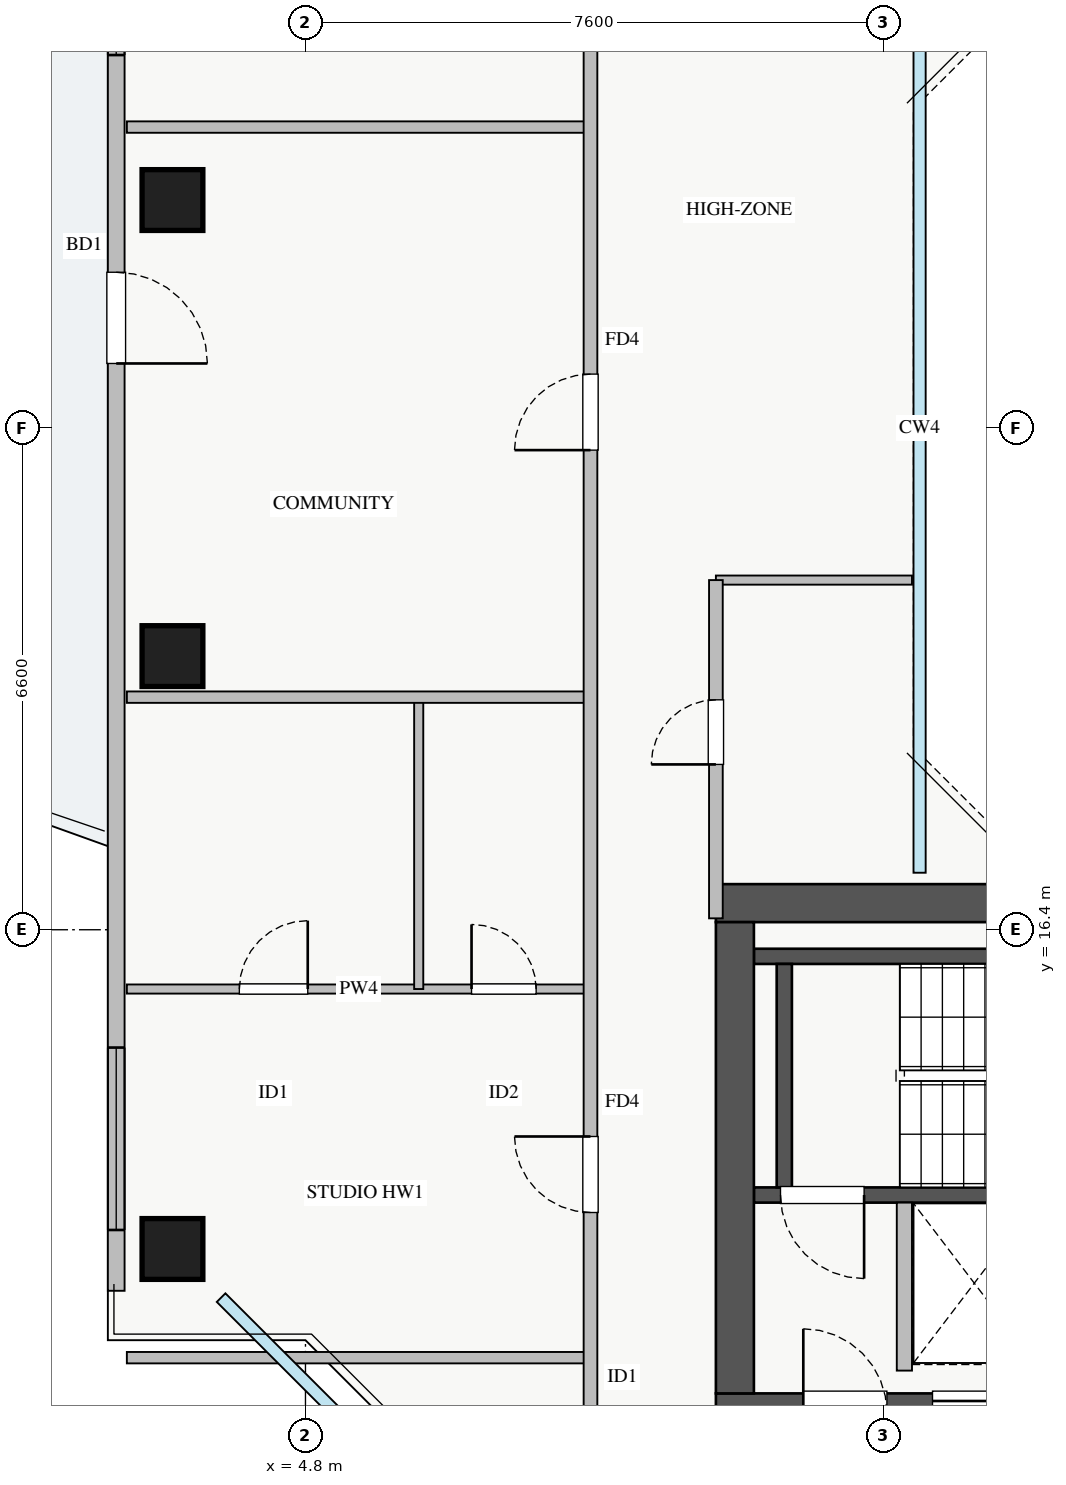
"""IFC4 building model, lengths in metres.
Left out: names, types, materials, properties, quantities, classifications, styles, units other than length and angle.
Written with IfcOpenShell. Run it as: python <this file> out.ifc"""

import sys

from ifc_helpers import new_model, si_unit, direction, frame, frame_2d, origin, origin_2d, place, context, subcontext, project, spatial, rectangle, extrude, source, transform, mapped, element, fill, save


model = new_model("IFC4")
c1 = context("Model", 3, precision=1e-05, world=origin(), true_north=direction((0.0, 1.0)))
c2 = subcontext(c1, "Body", "Model", "MODEL_VIEW")
j1 = project(units=[si_unit("LENGTHUNIT", "METRE"), si_unit("PLANEANGLEUNIT", "RADIAN")], contexts=[c1])
p1 = place(None, origin())
s1 = spatial("IfcSite", under=j1, at=p1, CompositionType="ELEMENT")
p2 = place(p1, origin())
s2 = spatial("IfcBuilding", under=s1, at=p2, CompositionType="ELEMENT")
p3 = place(p2, frame((0.0, 0.0, 203.5)))
s3 = spatial("IfcBuildingStorey", under=s2, at=p3, CompositionType="ELEMENT", Elevation=203.5)
p4 = place(p3, frame((12.68, 12.8, 0.0), z_axis=(0.0, 0.0, 1.0), x_axis=(1.0, 0.0, 0.0)))
e1 = element("IfcWall", 1, at=p4, inside=s3, PredefinedType="SHEAR", context=c2, shape_type="SweptSolid", body=[
    extrude(rectangle(XDim=1.94, YDim=0.18, at=frame_2d((0.97, 0.0))), origin(), (0.0, 0.0, 1.0), 3.07),
])
p5 = place(p3, frame((10.7, 12.91, 0.0), z_axis=(0.0, 0.0, 1.0), x_axis=(1.0, 0.0, 0.0)))
e2 = element("IfcWall", 2, at=p5, inside=s3, PredefinedType="SHEAR", context=c2, shape_type="SweptSolid", body=[
    extrude(rectangle(XDim=7.45, YDim=0.2, at=frame_2d((3.725, 0.0))), origin(), (0.0, 0.0, 1.0), 3.25),
])
p6 = place(p5, frame((0.35, 0.0, 0.0)))
e3 = element("IfcOpeningElement", 3, at=p6, cuts=e2, PredefinedType="OPENING", context=c2, shape_type="SweptSolid", body=[
    extrude(rectangle(XDim=1.1, YDim=2.05, at=frame_2d((0.55, 1.025))), frame((0.0, 0.11, 0.0), z_axis=(0.0, -1.0, 0.0), x_axis=(1.0, 0.0, 0.0)), (0.0, 0.0, 1.0), 0.22),
])
p7 = place(p3, frame((10.7, 16.05, 0.0), z_axis=(0.0, 0.0, 1.0), x_axis=(1.0, 0.0, 0.0)))
e4 = element("IfcWall", 4, at=p7, inside=s3, PredefinedType="SHEAR", context=c2, shape_type="SweptSolid", body=[
    extrude(rectangle(XDim=7.45, YDim=0.2, at=frame_2d((3.725, 0.0))), origin(), (0.0, 0.0, 1.0), 3.25),
])
p8 = place(p3, frame((11.1, 13.01, 0.0), z_axis=(0.0, 0.0, 1.0), x_axis=(0.0, 1.0, 0.0)))
e5 = element("IfcWall", 5, at=p8, inside=s3, PredefinedType="SHEAR", context=c2, shape_type="SweptSolid", body=[
    extrude(rectangle(XDim=2.94, YDim=0.2, at=frame_2d((1.47, 0.0))), origin(), (0.0, 0.0, 1.0), 3.25),
])
p9 = place(p3, frame((10.2, 10.05, 0.0), z_axis=(0.0, 0.0, 1.0), x_axis=(1.0, 0.0, 0.0)))
e6 = element("IfcWall", 6, at=p9, inside=s3, PredefinedType="SHEAR", context=c2, shape_type="SweptSolid", body=[
    extrude(rectangle(XDim=17.6, YDim=0.5, at=frame_2d((8.8, 0.0))), origin(), (0.0, 0.0, 1.0), 3.25),
])
p10 = place(p9, frame((1.15, 0.0, 0.0)))
e7 = element("IfcOpeningElement", 7, at=p10, cuts=e6, PredefinedType="OPENING", context=c2, shape_type="SweptSolid", body=[
    extrude(rectangle(XDim=1.1, YDim=2.05, at=frame_2d((0.55, 1.025))), frame((0.0, 0.26, 0.0), z_axis=(0.0, -1.0, 0.0), x_axis=(1.0, 0.0, 0.0)), (0.0, 0.0, 1.0), 0.52),
])
p11 = place(p9, frame((8.3, 0.0, 0.0)))
e8 = element("IfcOpeningElement", 8, at=p11, cuts=e6, PredefinedType="OPENING", context=c2, shape_type="SweptSolid", body=[
    extrude(rectangle(XDim=1.1, YDim=2.05, at=frame_2d((0.55, 1.025))), frame((0.0, 0.26, 0.0), z_axis=(0.0, -1.0, 0.0), x_axis=(1.0, 0.0, 0.0)), (0.0, 0.0, 1.0), 0.52),
])
p12 = place(p9, frame((2.85, 0.0, 0.0)))
e9 = element("IfcOpeningElement", 9, at=p12, cuts=e6, PredefinedType="OPENING", context=c2, shape_type="SweptSolid", body=[
    extrude(rectangle(XDim=1.1, YDim=2.05, at=frame_2d((0.55, 1.025))), frame((0.0, 0.26, 0.0), z_axis=(0.0, -1.0, 0.0), x_axis=(1.0, 0.0, 0.0)), (0.0, 0.0, 1.0), 0.52),
])
p13 = place(p9, frame((5.8, 0.0, 0.0)))
e10 = element("IfcOpeningElement", 10, at=p13, cuts=e6, PredefinedType="OPENING", context=c2, shape_type="SweptSolid", body=[
    extrude(rectangle(XDim=1.0, YDim=2.05, at=frame_2d((0.5, 1.025))), frame((0.0, 0.26, 0.0), z_axis=(0.0, -1.0, 0.0), x_axis=(1.0, 0.0, 0.0)), (0.0, 0.0, 1.0), 0.52),
])
p14 = place(p9, frame((14.74, 0.0, 0.0)))
e11 = element("IfcOpeningElement", 11, at=p14, cuts=e6, PredefinedType="OPENING", context=c2, shape_type="SweptSolid", body=[
    extrude(rectangle(XDim=1.0, YDim=2.05, at=frame_2d((0.5, 1.025))), frame((0.0, 0.26, 0.0), z_axis=(0.0, -1.0, 0.0), x_axis=(1.0, 0.0, 0.0)), (0.0, 0.0, 1.0), 0.52),
])
p15 = place(p9, frame((10.155, 0.0, 0.0)))
e12 = element("IfcOpeningElement", 12, at=p15, cuts=e6, PredefinedType="OPENING", context=c2, shape_type="SweptSolid", body=[
    extrude(rectangle(XDim=1.0, YDim=2.05, at=frame_2d((0.5, 1.025))), frame((0.0, 0.26, 0.0), z_axis=(0.0, -1.0, 0.0), x_axis=(1.0, 0.0, 0.0)), (0.0, 0.0, 1.0), 0.52),
])
p16 = place(p9, frame((11.87, 0.0, 0.0)))
e13 = element("IfcOpeningElement", 13, at=p16, cuts=e6, PredefinedType="OPENING", context=c2, shape_type="SweptSolid", body=[
    extrude(rectangle(XDim=1.0, YDim=2.05, at=frame_2d((0.5, 1.025))), frame((0.0, 0.26, 0.0), z_axis=(0.0, -1.0, 0.0), x_axis=(1.0, 0.0, 0.0)), (0.0, 0.0, 1.0), 0.52),
])
p17 = place(p9, frame((13.46, 0.0, 0.0)))
e14 = element("IfcOpeningElement", 14, at=p17, cuts=e6, PredefinedType="OPENING", context=c2, shape_type="SweptSolid", body=[
    extrude(rectangle(XDim=1.0, YDim=2.05, at=frame_2d((0.5, 1.025))), frame((0.0, 0.26, 0.0), z_axis=(0.0, -1.0, 0.0), x_axis=(1.0, 0.0, 0.0)), (0.0, 0.0, 1.0), 0.52),
])
p18 = place(p3, frame((10.2, 16.75, 0.0), z_axis=(0.0, 0.0, 1.0), x_axis=(1.0, 0.0, 0.0)))
e15 = element("IfcWall", 15, at=p18, inside=s3, PredefinedType="SHEAR", context=c2, shape_type="SweptSolid", body=[
    extrude(rectangle(XDim=17.6, YDim=0.5, at=frame_2d((8.8, 0.0))), origin(), (0.0, 0.0, 1.0), 3.25),
])
p19 = place(p3, frame((10.45, 10.3, 0.0), z_axis=(0.0, 0.0, 1.0), x_axis=(0.0, 1.0, 0.0)))
e16 = element("IfcWall", 16, at=p19, inside=s3, PredefinedType="SHEAR", context=c2, shape_type="SweptSolid", body=[
    extrude(rectangle(XDim=6.2, YDim=0.5, at=frame_2d((3.1, 0.0))), origin(), (0.0, 0.0, 1.0), 3.25),
])
m1 = source(origin(), c2, "Body", "SweptSolid", [
    extrude(rectangle(XDim=0.8, YDim=0.8, at=origin_2d()), origin(), (0.0, 0.0, 1.0), 3.25),
])
for number, where, z_axis, x_axis in (
    (17, (3.05, 26.0, 0.0), (0.0, 0.0, 1.0), (1.0, 0.0, 0.0)),
    (18, (3.05, 20.0, 0.0), (0.0, 0.0, 1.0), (1.0, 0.0, 0.0)),
    (19, (3.05, 12.2, 0.0), (0.0, 0.0, 1.0), (1.0, 0.0, 0.0)),
):
    element("IfcColumn", number, at=place(p3, frame(where, z_axis=z_axis, x_axis=x_axis)), inside=s3, PredefinedType="COLUMN", context=c2, shape_type="MappedRepresentation", body=[
        mapped(m1, transform((0.0, 0.0, 0.0), x_axis=(1.0, 0.0, 0.0), y_axis=(0.0, 1.0, 0.0), z_axis=(0.0, 0.0, 1.0), scale=1.0)),
    ])
p20 = place(p3, frame((2.31, 11.65, 0.0), z_axis=(0.0, 0.0, 1.0), x_axis=(0.0, 1.0, 0.0)))
e20 = element("IfcWall", 20, at=p20, inside=s3, PredefinedType="STANDARD", context=c2, shape_type="SweptSolid", body=[
    extrude(rectangle(XDim=22.7, YDim=0.22, at=frame_2d((11.35, 0.0))), origin(), (0.0, 0.0, 1.0), 2.61),
])
p21 = place(p20, frame((12.2, 0.0, 0.0)))
e21 = element("IfcOpeningElement", 21, at=p21, cuts=e20, PredefinedType="OPENING", context=c2, shape_type="SweptSolid", body=[
    extrude(rectangle(XDim=1.2, YDim=2.1, at=frame_2d((0.6, 1.05))), frame((0.0, 0.12, 0.0), z_axis=(0.0, -1.0, 0.0), x_axis=(1.0, 0.0, 0.0)), (0.0, 0.0, 1.0), 0.24),
])
p22 = place(p20, frame((0.8, 0.0, 0.9)))
e22 = element("IfcOpeningElement", 22, at=p22, cuts=e20, PredefinedType="OPENING", context=c2, shape_type="SweptSolid", body=[
    extrude(rectangle(XDim=2.4, YDim=1.5, at=frame_2d((1.2, 0.75))), frame((0.0, 0.12, 0.0), z_axis=(0.0, -1.0, 0.0), x_axis=(1.0, 0.0, 0.0)), (0.0, 0.0, 1.0), 0.24),
])
p23 = place(p20, frame((20.08, 0.0, 0.9)))
e23 = element("IfcOpeningElement", 23, at=p23, cuts=e20, PredefinedType="OPENING", context=c2, shape_type="SweptSolid", body=[
    extrude(rectangle(XDim=2.1, YDim=1.5, at=frame_2d((1.05, 0.75))), frame((0.0, 0.12, 0.0), z_axis=(0.0, -1.0, 0.0), x_axis=(1.0, 0.0, 0.0)), (0.0, 0.0, 1.0), 0.24),
])
p24 = place(p20, frame((16.258, 0.0, 0.9)))
e24 = element("IfcOpeningElement", 24, at=p24, cuts=e20, PredefinedType="OPENING", context=c2, shape_type="SweptSolid", body=[
    extrude(rectangle(XDim=2.4, YDim=1.5, at=frame_2d((1.2, 0.75))), frame((0.0, 0.12, 0.0), z_axis=(0.0, -1.0, 0.0), x_axis=(1.0, 0.0, 0.0)), (0.0, 0.0, 1.0), 0.24),
])
p25 = place(p3, frame((12.68, 10.6, 0.0), z_axis=(0.0, 0.0, 1.0), x_axis=(0.0, 1.0, 0.0)))
e25 = element("IfcWall", 25, at=p25, inside=s3, PredefinedType="PARTITIONING", context=c2, shape_type="SweptSolid", body=[
    extrude(rectangle(XDim=2.21, YDim=0.2, at=frame_2d((1.105, 0.0))), origin(), (0.0, 0.0, 1.0), 3.07),
])
p26 = place(p3, frame((2.45, 10.77, 0.0), z_axis=(0.0, 0.0, 1.0), x_axis=(1.0, 0.0, 0.0)))
e26 = element("IfcWall", 26, at=p26, inside=s3, PredefinedType="PARTITIONING", context=c2, shape_type="SweptSolid", body=[
    extrude(rectangle(XDim=6.1, YDim=0.15, at=frame_2d((3.05, 0.0))), origin(), (0.0, 0.0, 1.0), 3.07),
])
p27 = place(p3, frame((2.45, 15.62, 0.0), z_axis=(0.0, 0.0, 1.0), x_axis=(1.0, 0.0, 0.0)))
e27 = element("IfcWall", 27, at=p27, inside=s3, PredefinedType="PLUMBINGWALL", context=c2, shape_type="SweptSolid", body=[
    extrude(rectangle(XDim=6.1, YDim=0.12, at=frame_2d((3.05, 0.0))), origin(), (0.0, 0.0, 1.0), 3.07),
])
p28 = place(p27, frame((1.48, 0.0, 0.0)))
e28 = element("IfcOpeningElement", 28, at=p28, cuts=e27, PredefinedType="OPENING", context=c2, shape_type="SweptSolid", body=[
    extrude(rectangle(XDim=0.9, YDim=2.05, at=frame_2d((0.45, 1.025))), frame((0.0, 0.07, 0.0), z_axis=(0.0, -1.0, 0.0), x_axis=(1.0, 0.0, 0.0)), (0.0, 0.0, 1.0), 0.14),
])
p29 = place(p27, frame((4.535, 0.0, 0.0)))
e29 = element("IfcOpeningElement", 29, at=p29, cuts=e27, PredefinedType="OPENING", context=c2, shape_type="SweptSolid", body=[
    extrude(rectangle(XDim=0.85, YDim=2.05, at=frame_2d((0.425, 1.025))), frame((0.0, 0.07, 0.0), z_axis=(0.0, -1.0, 0.0), x_axis=(1.0, 0.0, 0.0)), (0.0, 0.0, 1.0), 0.14),
])
p30 = place(p3, frame((6.29, 15.62, 0.0), z_axis=(0.0, 0.0, 1.0), x_axis=(0.0, 1.0, 0.0)))
e30 = element("IfcWall", 30, at=p30, inside=s3, PredefinedType="PLUMBINGWALL", context=c2, shape_type="SweptSolid", body=[
    extrude(rectangle(XDim=3.84, YDim=0.12, at=frame_2d((1.92, 0.0))), origin(), (0.0, 0.0, 1.0), 3.07),
])
for number, where, z_axis, x_axis in (
    (31, (2.45, 19.46, 0.0), (0.0, 0.0, 1.0), (1.0, 0.0, 0.0)),
    (32, (2.45, 26.96, 0.0), (0.0, 0.0, 1.0), (1.0, 0.0, 0.0)),
):
    element("IfcWall", number, at=place(p3, frame(where, z_axis=z_axis, x_axis=x_axis)), inside=s3, PredefinedType="PARTITIONING", context=c2, shape_type="SweptSolid", body=[
        extrude(rectangle(XDim=6.1, YDim=0.15, at=frame_2d((3.05, 0.0))), origin(), (0.0, 0.0, 1.0), 3.07),
    ])
p31 = place(p3, frame((8.55, 6.2, 0.0), z_axis=(0.0, 0.0, 1.0), x_axis=(0.0, 1.0, 0.0)))
e33 = element("IfcWall", 33, at=p31, inside=s3, PredefinedType="PARTITIONING", context=c2, shape_type="SweptSolid", body=[
    extrude(rectangle(XDim=33.6, YDim=0.18, at=frame_2d((16.8, 0.0))), origin(), (0.0, 0.0, 1.0), 3.07),
])
p32 = place(p31, frame((29.605, 0.0, 0.0)))
e34 = element("IfcOpeningElement", 34, at=p32, cuts=e33, PredefinedType="OPENING", context=c2, shape_type="SweptSolid", body=[
    extrude(rectangle(XDim=0.9, YDim=2.05, at=frame_2d((0.45, 1.025))), frame((0.0, 0.1, 0.0), z_axis=(0.0, -1.0, 0.0), x_axis=(1.0, 0.0, 0.0)), (0.0, 0.0, 1.0), 0.2),
])
p33 = place(p31, frame((2.92, 0.0, 0.0)))
e35 = element("IfcOpeningElement", 35, at=p33, cuts=e33, PredefinedType="OPENING", context=c2, shape_type="SweptSolid", body=[
    extrude(rectangle(XDim=0.9, YDim=2.05, at=frame_2d((0.45, 1.025))), frame((0.0, 0.1, 0.0), z_axis=(0.0, -1.0, 0.0), x_axis=(1.0, 0.0, 0.0)), (0.0, 0.0, 1.0), 0.2),
])
p34 = place(p31, frame((6.48, 0.0, 0.0)))
e36 = element("IfcOpeningElement", 36, at=p34, cuts=e33, PredefinedType="OPENING", context=c2, shape_type="SweptSolid", body=[
    extrude(rectangle(XDim=1.0, YDim=2.05, at=frame_2d((0.5, 1.025))), frame((0.0, 0.1, 0.0), z_axis=(0.0, -1.0, 0.0), x_axis=(1.0, 0.0, 0.0)), (0.0, 0.0, 1.0), 0.2),
])
p35 = place(p31, frame((16.51, 0.0, 0.0)))
e37 = element("IfcOpeningElement", 37, at=p35, cuts=e33, PredefinedType="OPENING", context=c2, shape_type="SweptSolid", body=[
    extrude(rectangle(XDim=1.0, YDim=2.05, at=frame_2d((0.5, 1.025))), frame((0.0, 0.1, 0.0), z_axis=(0.0, -1.0, 0.0), x_axis=(1.0, 0.0, 0.0)), (0.0, 0.0, 1.0), 0.2),
])
p36 = place(p31, frame((22.21, 0.0, 0.0)))
e38 = element("IfcOpeningElement", 38, at=p36, cuts=e33, PredefinedType="OPENING", context=c2, shape_type="SweptSolid", body=[
    extrude(rectangle(XDim=1.0, YDim=2.05, at=frame_2d((0.5, 1.025))), frame((0.0, 0.1, 0.0), z_axis=(0.0, -1.0, 0.0), x_axis=(1.0, 0.0, 0.0)), (0.0, 0.0, 1.0), 0.2),
])
p37 = place(p3, frame((10.2, 21.0, 0.0), z_axis=(0.0, 0.0, 1.0), x_axis=(1.0, 0.0, 0.0)))
e39 = element("IfcWall", 39, at=p37, inside=s3, PredefinedType="PLUMBINGWALL", context=c2, shape_type="SweptSolid", body=[
    extrude(rectangle(XDim=2.58, YDim=0.12, at=frame_2d((1.29, 0.0))), origin(), (0.0, 0.0, 1.0), 3.07),
])
p38 = place(p3, frame((10.2, 16.55, 0.0), z_axis=(0.0, 0.0, 1.0), x_axis=(0.0, 1.0, 0.0)))
e40 = element("IfcWall", 40, at=p38, inside=s3, PredefinedType="PARTITIONING", context=c2, shape_type="SweptSolid", body=[
    extrude(rectangle(XDim=4.45, YDim=0.18, at=frame_2d((2.225, 0.0))), origin(), (0.0, 0.0, 1.0), 3.07),
])
p39 = place(p38, frame((2.025, 0.0, 0.0)))
e41 = element("IfcOpeningElement", 41, at=p39, cuts=e40, PredefinedType="OPENING", context=c2, shape_type="SweptSolid", body=[
    extrude(rectangle(XDim=0.85, YDim=2.05, at=frame_2d((0.425, 1.025))), frame((0.0, 0.1, 0.0), z_axis=(0.0, -1.0, 0.0), x_axis=(1.0, 0.0, 0.0)), (0.0, 0.0, 1.0), 0.2),
])
m2 = source(origin(), c2, "Body", "SweptSolid", [
    extrude(rectangle(XDim=1.2, YDim=2.1, at=frame_2d((0.6, 1.05))), frame((0.0, 0.025, 0.0), z_axis=(0.0, -1.0, 0.0), x_axis=(1.0, 0.0, 0.0)), (0.0, 0.0, 1.0), 0.05),
])
p40 = place(p21, frame((1.2, 0.0, 0.0), z_axis=(0.0, 0.0, 1.0), x_axis=(-1.0, 0.0, 0.0)))
e42 = element("IfcDoor", 42, at=p40, inside=s3, OperationType="SINGLE_SWING_LEFT", PredefinedType="DOOR", context=c2, shape_type="MappedRepresentation", body=[
    mapped(m2, transform((0.0, 0.0, 0.0), x_axis=(1.0, 0.0, 0.0), y_axis=(0.0, 1.0, 0.0), z_axis=(0.0, 0.0, 1.0), scale=1.0)),
])
fill(e21, e42)
m3 = source(origin(), c2, "Body", "SweptSolid", [
    extrude(rectangle(XDim=2.4, YDim=1.5, at=frame_2d((1.2, 0.75))), frame((0.0, 0.03, 0.0), z_axis=(0.0, -1.0, 0.0), x_axis=(1.0, 0.0, 0.0)), (0.0, 0.0, 1.0), 0.06),
])
p41 = place(p22, origin())
e43 = element("IfcWindow", 43, at=p41, inside=s3, PartitioningType="TRIPLE_PANEL_VERTICAL", PredefinedType="WINDOW", context=c2, shape_type="MappedRepresentation", body=[
    mapped(m3, transform((0.0, 0.0, 0.0), x_axis=(1.0, 0.0, 0.0), y_axis=(0.0, 1.0, 0.0), z_axis=(0.0, 0.0, 1.0), scale=1.0)),
])
fill(e22, e43)
m4 = source(origin(), c2, "Body", "SweptSolid", [
    extrude(rectangle(XDim=1.1, YDim=2.05, at=frame_2d((0.55, 1.025))), frame((0.0, 0.025, 0.0), z_axis=(0.0, -1.0, 0.0), x_axis=(1.0, 0.0, 0.0)), (0.0, 0.0, 1.0), 0.05),
])
p42 = place(p6, frame((1.1, 0.0, 0.0), z_axis=(0.0, 0.0, 1.0), x_axis=(-1.0, 0.0, 0.0)))
e44 = element("IfcDoor", 44, at=p42, inside=s3, OperationType="SINGLE_SWING_RIGHT", PredefinedType="DOOR", context=c2, shape_type="MappedRepresentation", body=[
    mapped(m4, transform((0.0, 0.0, 0.0), x_axis=(1.0, 0.0, 0.0), y_axis=(0.0, 1.0, 0.0), z_axis=(0.0, 0.0, 1.0), scale=1.0)),
])
fill(e3, e44)
m5 = source(origin(), c2, "Body", "SweptSolid", [
    extrude(rectangle(XDim=0.9, YDim=2.05, at=frame_2d((0.45, 1.025))), frame((0.0, 0.025, 0.0), z_axis=(0.0, -1.0, 0.0), x_axis=(1.0, 0.0, 0.0)), (0.0, 0.0, 1.0), 0.05),
])
p43 = place(p28, origin())
e45 = element("IfcDoor", 45, at=p43, inside=s3, OperationType="SINGLE_SWING_RIGHT", PredefinedType="DOOR", context=c2, shape_type="MappedRepresentation", body=[
    mapped(m5, transform((0.0, 0.0, 0.0), x_axis=(1.0, 0.0, 0.0), y_axis=(0.0, 1.0, 0.0), z_axis=(0.0, 0.0, 1.0), scale=1.0)),
])
fill(e28, e45)
m6 = source(origin(), c2, "Body", "SweptSolid", [
    extrude(rectangle(XDim=0.85, YDim=2.05, at=frame_2d((0.425, 1.025))), frame((0.0, 0.025, 0.0), z_axis=(0.0, -1.0, 0.0), x_axis=(1.0, 0.0, 0.0)), (0.0, 0.0, 1.0), 0.05),
])
p44 = place(p29, origin())
e46 = element("IfcDoor", 46, at=p44, inside=s3, OperationType="SINGLE_SWING_LEFT", PredefinedType="DOOR", context=c2, shape_type="MappedRepresentation", body=[
    mapped(m6, transform((0.0, 0.0, 0.0), x_axis=(1.0, 0.0, 0.0), y_axis=(0.0, 1.0, 0.0), z_axis=(0.0, 0.0, 1.0), scale=1.0)),
])
fill(e29, e46)
m7 = source(origin(), c2, "Body", "SweptSolid", [
    extrude(rectangle(XDim=1.0, YDim=2.05, at=frame_2d((0.5, 1.025))), frame((0.0, 0.025, 0.0), z_axis=(0.0, -1.0, 0.0), x_axis=(1.0, 0.0, 0.0)), (0.0, 0.0, 1.0), 0.05),
])
p45 = place(p34, origin())
e47 = element("IfcDoor", 47, at=p45, inside=s3, OperationType="SINGLE_SWING_RIGHT", PredefinedType="DOOR", context=c2, shape_type="MappedRepresentation", body=[
    mapped(m7, transform((0.0, 0.0, 0.0), x_axis=(1.0, 0.0, 0.0), y_axis=(0.0, 1.0, 0.0), z_axis=(0.0, 0.0, 1.0), scale=1.0)),
])
fill(e36, e47)
p46 = place(p35, origin())
e48 = element("IfcDoor", 48, at=p46, inside=s3, OperationType="SINGLE_SWING_LEFT", PredefinedType="DOOR", context=c2, shape_type="MappedRepresentation", body=[
    mapped(m7, transform((0.0, 0.0, 0.0), x_axis=(1.0, 0.0, 0.0), y_axis=(0.0, 1.0, 0.0), z_axis=(0.0, 0.0, 1.0), scale=1.0)),
])
fill(e37, e48)
p47 = place(p39, origin())
e49 = element("IfcDoor", 49, at=p47, inside=s3, OperationType="SINGLE_SWING_LEFT", PredefinedType="DOOR", context=c2, shape_type="MappedRepresentation", body=[
    mapped(m6, transform((0.0, 0.0, 0.0), x_axis=(1.0, 0.0, 0.0), y_axis=(0.0, 1.0, 0.0), z_axis=(0.0, 0.0, 1.0), scale=1.0)),
])
fill(e41, e49)
p48 = place(p24, origin())
e50 = element("IfcWindow", 50, at=p48, inside=s3, PartitioningType="TRIPLE_PANEL_VERTICAL", PredefinedType="WINDOW", context=c2, shape_type="MappedRepresentation", body=[
    mapped(m3, transform((0.0, 0.0, 0.0), x_axis=(1.0, 0.0, 0.0), y_axis=(0.0, 1.0, 0.0), z_axis=(0.0, 0.0, 1.0), scale=1.0)),
])
fill(e24, e50)
save(model, sys.argv[1])
